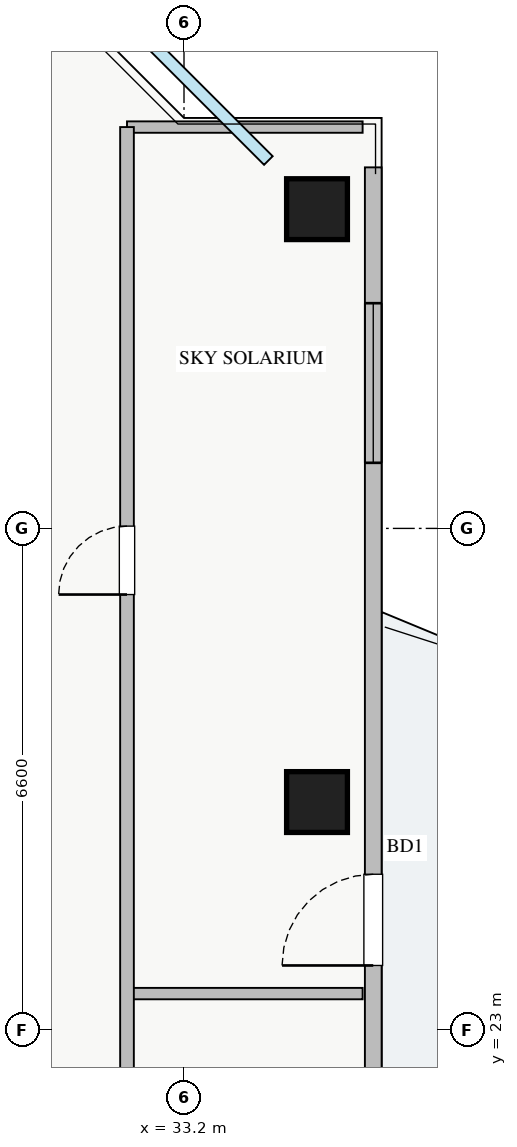
"""IFC4 building model, lengths in metres.
Left out: names, types, materials, properties, quantities, classifications, styles, units other than length and angle.
Written with IfcOpenShell. Run it as: python <this file> out.ifc"""

import sys

from ifc_helpers import new_model, si_unit, direction, frame, frame_2d, origin, origin_2d, place, context, subcontext, project, spatial, rectangle, extrude, source, transform, mapped, element, fill, save


model = new_model("IFC4")
c1 = context("Model", 3, precision=1e-05, world=origin(), true_north=direction((0.0, 1.0)))
c2 = subcontext(c1, "Body", "Model", "MODEL_VIEW")
j1 = project(units=[si_unit("LENGTHUNIT", "METRE"), si_unit("PLANEANGLEUNIT", "RADIAN")], contexts=[c1])
p1 = place(None, origin())
s1 = spatial("IfcSite", under=j1, at=p1, CompositionType="ELEMENT")
p2 = place(p1, origin())
s2 = spatial("IfcBuilding", under=s1, at=p2, CompositionType="ELEMENT")
p3 = place(p2, frame((0.0, 0.0, 193.75)))
s3 = spatial("IfcBuildingStorey", under=s2, at=p3, CompositionType="ELEMENT", Elevation=193.75)
m1 = source(origin(), c2, "Body", "SweptSolid", [
    extrude(rectangle(XDim=0.8, YDim=0.8, at=origin_2d()), origin(), (0.0, 0.0, 1.0), 3.25),
])
for number, where, z_axis, x_axis in (
    (1, (34.95, 26.0, 0.0), (0.0, 0.0, 1.0), (1.0, 0.0, 0.0)),
    (2, (34.95, 33.8, 0.0), (0.0, 0.0, 1.0), (1.0, 0.0, 0.0)),
):
    element("IfcColumn", number, at=place(p3, frame(where, z_axis=z_axis, x_axis=x_axis)), inside=s3, PredefinedType="COLUMN", context=c2, shape_type="MappedRepresentation", body=[
        mapped(m1, transform((0.0, 0.0, 0.0), x_axis=(1.0, 0.0, 0.0), y_axis=(0.0, 1.0, 0.0), z_axis=(0.0, 0.0, 1.0), scale=1.0)),
    ])
p4 = place(p3, frame((35.69, 11.65, 0.0), z_axis=(0.0, 0.0, 1.0), x_axis=(0.0, 1.0, 0.0)))
e3 = element("IfcWall", 3, at=p4, inside=s3, PredefinedType="STANDARD", context=c2, shape_type="SweptSolid", body=[
    extrude(rectangle(XDim=22.7, YDim=0.22, at=frame_2d((11.35, 0.0))), origin(), (0.0, 0.0, 1.0), 2.61),
])
p5 = place(p4, frame((12.2, 0.0, 0.0)))
e4 = element("IfcOpeningElement", 4, at=p5, cuts=e3, PredefinedType="OPENING", context=c2, shape_type="SweptSolid", body=[
    extrude(rectangle(XDim=1.2, YDim=2.1, at=frame_2d((0.6, 1.05))), frame((0.0, 0.12, 0.0), z_axis=(0.0, -1.0, 0.0), x_axis=(1.0, 0.0, 0.0)), (0.0, 0.0, 1.0), 0.24),
])
p6 = place(p4, frame((1.638, 0.0, 0.9)))
e5 = element("IfcOpeningElement", 5, at=p6, cuts=e3, PredefinedType="OPENING", context=c2, shape_type="SweptSolid", body=[
    extrude(rectangle(XDim=2.4, YDim=1.48, at=frame_2d((1.2, 0.74))), frame((0.0, 0.12, 0.0), z_axis=(0.0, -1.0, 0.0), x_axis=(1.0, 0.0, 0.0)), (0.0, 0.0, 1.0), 0.24),
])
p7 = place(p4, frame((18.813, 0.0, 0.9)))
e6 = element("IfcOpeningElement", 6, at=p7, cuts=e3, PredefinedType="OPENING", context=c2, shape_type="SweptSolid", body=[
    extrude(rectangle(XDim=2.1, YDim=1.48, at=frame_2d((1.05, 0.74))), frame((0.0, 0.12, 0.0), z_axis=(0.0, -1.0, 0.0), x_axis=(1.0, 0.0, 0.0)), (0.0, 0.0, 1.0), 0.24),
])
for number, where, z_axis, x_axis in (
    (7, (32.45, 34.88, 0.0), (0.0, 0.0, 1.0), (1.0, 0.0, 0.0)),
    (8, (32.45, 23.48, 0.0), (0.0, 0.0, 1.0), (1.0, 0.0, 0.0)),
):
    element("IfcWall", number, at=place(p3, frame(where, z_axis=z_axis, x_axis=x_axis)), inside=s3, PredefinedType="PARTITIONING", context=c2, shape_type="SweptSolid", body=[
        extrude(rectangle(XDim=3.1, YDim=0.15, at=frame_2d((1.55, 0.0))), origin(), (0.0, 0.0, 1.0), 3.07),
    ])
p8 = place(p3, frame((32.45, 11.12, 0.0), z_axis=(0.0, 0.0, 1.0), x_axis=(0.0, 1.0, 0.0)))
e9 = element("IfcWall", 9, at=p8, inside=s3, PredefinedType="PARTITIONING", context=c2, shape_type="SweptSolid", body=[
    extrude(rectangle(XDim=23.76, YDim=0.18, at=frame_2d((11.88, 0.0))), origin(), (0.0, 0.0, 1.0), 3.07),
])
p9 = place(p8, frame((5.73, 0.0, 0.0)))
e10 = element("IfcOpeningElement", 10, at=p9, cuts=e9, PredefinedType="OPENING", context=c2, shape_type="SweptSolid", body=[
    extrude(rectangle(XDim=0.9, YDim=2.05, at=frame_2d((0.45, 1.025))), frame((0.0, 0.1, 0.0), z_axis=(0.0, -1.0, 0.0), x_axis=(1.0, 0.0, 0.0)), (0.0, 0.0, 1.0), 0.2),
])
p10 = place(p8, frame((17.61, 0.0, 0.0)))
e11 = element("IfcOpeningElement", 11, at=p10, cuts=e9, PredefinedType="OPENING", context=c2, shape_type="SweptSolid", body=[
    extrude(rectangle(XDim=0.9, YDim=2.05, at=frame_2d((0.45, 1.025))), frame((0.0, 0.1, 0.0), z_axis=(0.0, -1.0, 0.0), x_axis=(1.0, 0.0, 0.0)), (0.0, 0.0, 1.0), 0.2),
])
m2 = source(origin(), c2, "Body", "SweptSolid", [
    extrude(rectangle(XDim=1.2, YDim=2.1, at=frame_2d((0.6, 1.05))), frame((0.0, 0.025, 0.0), z_axis=(0.0, -1.0, 0.0), x_axis=(1.0, 0.0, 0.0)), (0.0, 0.0, 1.0), 0.05),
])
p11 = place(p5, origin())
e12 = element("IfcDoor", 12, at=p11, inside=s3, OperationType="SINGLE_SWING_LEFT", PredefinedType="DOOR", context=c2, shape_type="MappedRepresentation", body=[
    mapped(m2, transform((0.0, 0.0, 0.0), x_axis=(1.0, 0.0, 0.0), y_axis=(0.0, 1.0, 0.0), z_axis=(0.0, 0.0, 1.0), scale=1.0)),
])
fill(e4, e12)
m3 = source(origin(), c2, "Body", "SweptSolid", [
    extrude(rectangle(XDim=2.1, YDim=1.48, at=frame_2d((1.05, 0.74))), frame((0.0, 0.03, 0.0), z_axis=(0.0, -1.0, 0.0), x_axis=(1.0, 0.0, 0.0)), (0.0, 0.0, 1.0), 0.06),
])
p12 = place(p7, origin())
e13 = element("IfcWindow", 13, at=p12, inside=s3, PartitioningType="TRIPLE_PANEL_VERTICAL", PredefinedType="WINDOW", context=c2, shape_type="MappedRepresentation", body=[
    mapped(m3, transform((0.0, 0.0, 0.0), x_axis=(1.0, 0.0, 0.0), y_axis=(0.0, 1.0, 0.0), z_axis=(0.0, 0.0, 1.0), scale=1.0)),
])
fill(e6, e13)
m4 = source(origin(), c2, "Body", "SweptSolid", [
    extrude(rectangle(XDim=0.9, YDim=2.05, at=frame_2d((0.45, 1.025))), frame((0.0, 0.025, 0.0), z_axis=(0.0, -1.0, 0.0), x_axis=(1.0, 0.0, 0.0)), (0.0, 0.0, 1.0), 0.05),
])
p13 = place(p10, origin())
e14 = element("IfcDoor", 14, at=p13, inside=s3, OperationType="SINGLE_SWING_LEFT", PredefinedType="DOOR", context=c2, shape_type="MappedRepresentation", body=[
    mapped(m4, transform((0.0, 0.0, 0.0), x_axis=(1.0, 0.0, 0.0), y_axis=(0.0, 1.0, 0.0), z_axis=(0.0, 0.0, 1.0), scale=1.0)),
])
fill(e11, e14)
save(model, sys.argv[1])
